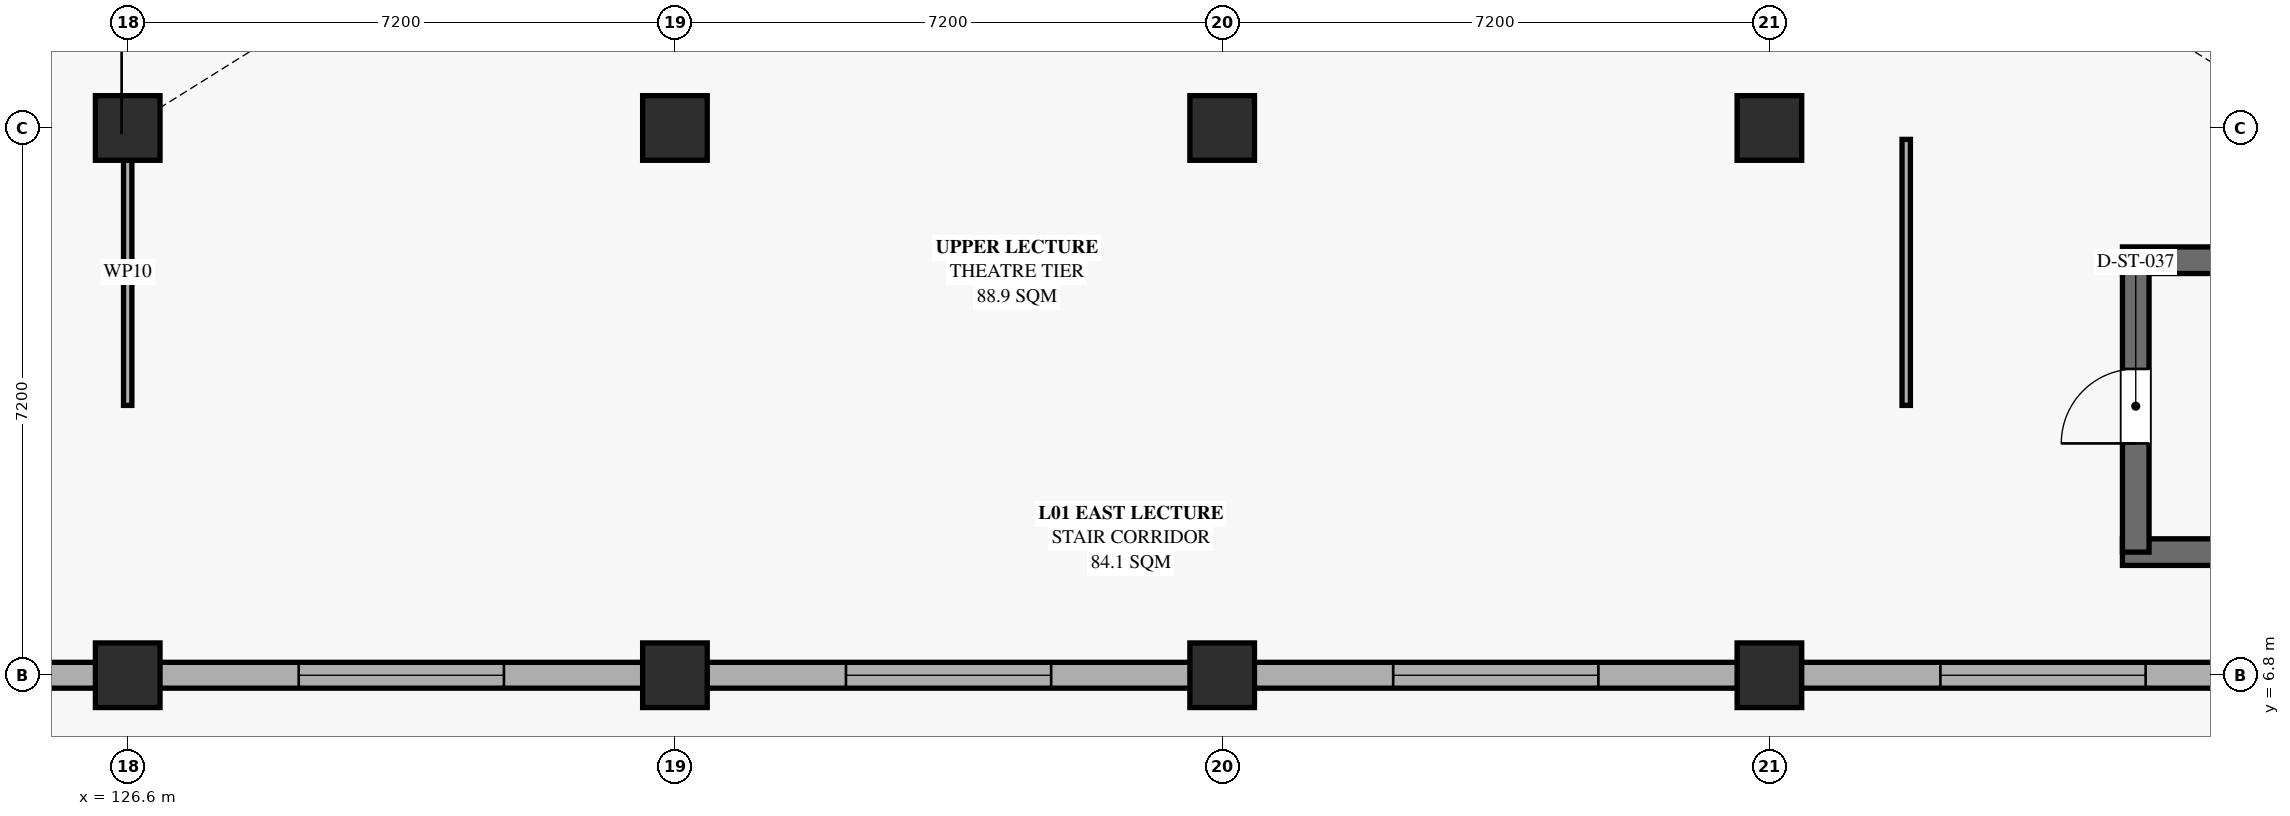
"""IFC4 building model, lengths in metres.
Left out: names, types, materials, properties, quantities, classifications, styles, units other than length and angle.
Written with IfcOpenShell. Run it as: python <this file> out.ifc"""

import sys

from ifc_helpers import new_model, si_unit, direction, frame, frame_2d, origin, origin_2d, place, context, subcontext, project, spatial, rectangle, extrude, element, fill, save


model = new_model("IFC4")
c1 = context("Model", 3, precision=1e-05, world=origin(), true_north=direction((0.0, 1.0)))
c2 = subcontext(c1, "Body", "Model", "MODEL_VIEW")
j1 = project(units=[si_unit("LENGTHUNIT", "METRE"), si_unit("PLANEANGLEUNIT", "RADIAN")], contexts=[c1])
p1 = place(None, origin())
s1 = spatial("IfcSite", under=j1, at=p1, CompositionType="ELEMENT")
p2 = place(p1, origin())
s2 = spatial("IfcBuilding", under=s1, at=p2, CompositionType="ELEMENT")
p3 = place(p2, frame((0.0, 0.0, 5.4)))
s3 = spatial("IfcBuildingStorey", under=s2, at=p3, CompositionType="ELEMENT", Elevation=5.4)
for number, where, z_axis, x_axis in (
    (1, (126.6, 6.8, 0.0), (0.0, 0.0, 1.0), (1.0, 0.0, 0.0)),
    (2, (133.8, 6.8, 0.0), (0.0, 0.0, 1.0), (1.0, 0.0, 0.0)),
    (3, (141.0, 6.8, 0.0), (0.0, 0.0, 1.0), (1.0, 0.0, 0.0)),
    (4, (148.2, 6.8, 0.0), (0.0, 0.0, 1.0), (1.0, 0.0, 0.0)),
    (5, (126.6, 14.0, 0.0), (0.0, 0.0, 1.0), (1.0, 0.0, 0.0)),
    (6, (133.8, 14.0, 0.0), (0.0, 0.0, 1.0), (1.0, 0.0, 0.0)),
    (7, (141.0, 14.0, 0.0), (0.0, 0.0, 1.0), (1.0, 0.0, 0.0)),
    (8, (148.2, 14.0, 0.0), (0.0, 0.0, 1.0), (1.0, 0.0, 0.0)),
):
    element("IfcColumn", number, at=place(p3, frame(where, z_axis=z_axis, x_axis=x_axis)), inside=s3, PredefinedType="COLUMN", context=c2, shape_type="SweptSolid", body=[
        extrude(rectangle(XDim=0.85, YDim=0.85, at=origin_2d()), origin(), (0.0, 0.0, 1.0), 5.04),
    ])
p4 = place(p3, frame((154.99, 6.8, 0.0), z_axis=(0.0, 0.0, 1.0), x_axis=(-1.0, 0.0, 0.0)))
e9 = element("IfcWall", 9, at=p4, inside=s3, PredefinedType="SOLIDWALL", context=c2, shape_type="SweptSolid", body=[
    extrude(rectangle(XDim=6.38, YDim=0.34, at=frame_2d((3.19, 0.0))), origin(), (0.0, 0.0, 1.0), 3.54),
])
p5 = place(p4, frame((1.84, 0.0, 0.9)))
e10 = element("IfcOpeningElement", 10, at=p5, cuts=e9, PredefinedType="OPENING", context=c2, shape_type="SweptSolid", body=[
    extrude(rectangle(XDim=2.7, YDim=2.5, at=frame_2d((1.35, 1.25))), frame((0.0, 0.18, 0.0), z_axis=(0.0, -1.0, 0.0), x_axis=(1.0, 0.0, 0.0)), (0.0, 0.0, 1.0), 0.36),
])
p6 = place(p3, frame((147.79, 6.8, 0.0), z_axis=(0.0, 0.0, 1.0), x_axis=(-1.0, 0.0, 0.0)))
e11 = element("IfcWall", 11, at=p6, inside=s3, PredefinedType="SOLIDWALL", context=c2, shape_type="SweptSolid", body=[
    extrude(rectangle(XDim=6.38, YDim=0.34, at=frame_2d((3.19, 0.0))), origin(), (0.0, 0.0, 1.0), 3.54),
])
p7 = place(p6, frame((1.84, 0.0, 0.9)))
e12 = element("IfcOpeningElement", 12, at=p7, cuts=e11, PredefinedType="OPENING", context=c2, shape_type="SweptSolid", body=[
    extrude(rectangle(XDim=2.7, YDim=2.5, at=frame_2d((1.35, 1.25))), frame((0.0, 0.18, 0.0), z_axis=(0.0, -1.0, 0.0), x_axis=(1.0, 0.0, 0.0)), (0.0, 0.0, 1.0), 0.36),
])
p8 = place(p3, frame((140.59, 6.8, 0.0), z_axis=(0.0, 0.0, 1.0), x_axis=(-1.0, 0.0, 0.0)))
e13 = element("IfcWall", 13, at=p8, inside=s3, PredefinedType="SOLIDWALL", context=c2, shape_type="SweptSolid", body=[
    extrude(rectangle(XDim=6.38, YDim=0.34, at=frame_2d((3.19, 0.0))), origin(), (0.0, 0.0, 1.0), 3.54),
])
p9 = place(p8, frame((1.84, 0.0, 0.9)))
e14 = element("IfcOpeningElement", 14, at=p9, cuts=e13, PredefinedType="OPENING", context=c2, shape_type="SweptSolid", body=[
    extrude(rectangle(XDim=2.7, YDim=2.5, at=frame_2d((1.35, 1.25))), frame((0.0, 0.18, 0.0), z_axis=(0.0, -1.0, 0.0), x_axis=(1.0, 0.0, 0.0)), (0.0, 0.0, 1.0), 0.36),
])
p10 = place(p3, frame((133.39, 6.8, 0.0), z_axis=(0.0, 0.0, 1.0), x_axis=(-1.0, 0.0, 0.0)))
e15 = element("IfcWall", 15, at=p10, inside=s3, PredefinedType="SOLIDWALL", context=c2, shape_type="SweptSolid", body=[
    extrude(rectangle(XDim=6.38, YDim=0.34, at=frame_2d((3.19, 0.0))), origin(), (0.0, 0.0, 1.0), 3.54),
])
p11 = place(p10, frame((1.84, 0.0, 0.9)))
e16 = element("IfcOpeningElement", 16, at=p11, cuts=e15, PredefinedType="OPENING", context=c2, shape_type="SweptSolid", body=[
    extrude(rectangle(XDim=2.7, YDim=2.5, at=frame_2d((1.35, 1.25))), frame((0.0, 0.18, 0.0), z_axis=(0.0, -1.0, 0.0), x_axis=(1.0, 0.0, 0.0)), (0.0, 0.0, 1.0), 0.36),
])
p12 = place(p3, frame((126.19, 6.8, 0.0), z_axis=(0.0, 0.0, 1.0), x_axis=(-1.0, 0.0, 0.0)))
e17 = element("IfcWall", 17, at=p12, inside=s3, PredefinedType="SOLIDWALL", context=c2, shape_type="SweptSolid", body=[
    extrude(rectangle(XDim=6.33, YDim=0.34, at=frame_2d((3.165, 0.0))), origin(), (0.0, 0.0, 1.0), 3.54),
])
p13 = place(p12, frame((1.815, 0.0, 0.9)))
e18 = element("IfcOpeningElement", 18, at=p13, cuts=e17, PredefinedType="OPENING", context=c2, shape_type="SweptSolid", body=[
    extrude(rectangle(XDim=2.7, YDim=2.5, at=frame_2d((1.35, 1.25))), frame((0.0, 0.18, 0.0), z_axis=(0.0, -1.0, 0.0), x_axis=(1.0, 0.0, 0.0)), (0.0, 0.0, 1.0), 0.36),
])
for number, where, z_axis, x_axis in (
    (19, (160.855, 8.42, 0.0), (0.0, 0.0, 1.0), (-1.0, 0.0, 0.0)),
    (20, (152.845, 12.26, 0.0), (0.0, 0.0, 1.0), (1.0, 0.0, 0.0)),
):
    element("IfcWall", number, at=place(p3, frame(where, z_axis=z_axis, x_axis=x_axis)), inside=s3, PredefinedType="SHEAR", context=c2, shape_type="SweptSolid", body=[
        extrude(rectangle(XDim=8.01, YDim=0.35, at=frame_2d((4.005, 0.0))), origin(), (0.0, 0.0, 1.0), 4.77),
    ])
p14 = place(p3, frame((153.02, 8.42, 0.0), z_axis=(0.0, 0.0, 1.0), x_axis=(0.0, 1.0, 0.0)))
e21 = element("IfcWall", 21, at=p14, inside=s3, PredefinedType="SHEAR", context=c2, shape_type="SweptSolid", body=[
    extrude(rectangle(XDim=3.84, YDim=0.35, at=frame_2d((1.92, 0.0))), origin(), (0.0, 0.0, 1.0), 4.77),
])
p15 = place(p14, frame((1.43, 0.0, 0.0)))
e22 = element("IfcOpeningElement", 22, at=p15, cuts=e21, PredefinedType="OPENING", context=c2, shape_type="SweptSolid", body=[
    extrude(rectangle(XDim=0.98, YDim=2.12, at=frame_2d((0.49, 1.06))), frame((0.0, 0.185, 0.0), z_axis=(0.0, -1.0, 0.0), x_axis=(1.0, 0.0, 0.0)), (0.0, 0.0, 1.0), 0.37),
])
for number, where, z_axis, x_axis in (
    (23, (126.6, 10.35, 0.0), (0.0, 0.0, 1.0), (0.0, 1.0, 0.0)),
    (24, (150.0, 13.85, 0.0), (0.0, 0.0, 1.0), (0.0, -1.0, 0.0)),
):
    element("IfcWall", number, at=place(p3, frame(where, z_axis=z_axis, x_axis=x_axis)), inside=s3, PredefinedType="PARTITIONING", context=c2, shape_type="SweptSolid", body=[
        extrude(rectangle(XDim=3.5, YDim=0.11, at=frame_2d((1.75, 0.0))), origin(), (0.0, 0.0, 1.0), 3.52),
    ])
p16 = place(p5, origin())
e25 = element("IfcWindow", 25, at=p16, inside=s3, PartitioningType="DOUBLE_PANEL_VERTICAL", PredefinedType="WINDOW", context=c2, shape_type="SweptSolid", body=[
    extrude(rectangle(XDim=2.7, YDim=2.5, at=frame_2d((1.35, 1.25))), frame((0.0, 0.03, 0.0), z_axis=(0.0, -1.0, 0.0), x_axis=(1.0, 0.0, 0.0)), (0.0, 0.0, 1.0), 0.06),
])
fill(e10, e25)
p17 = place(p7, origin())
e26 = element("IfcWindow", 26, at=p17, inside=s3, PartitioningType="DOUBLE_PANEL_VERTICAL", PredefinedType="WINDOW", context=c2, shape_type="SweptSolid", body=[
    extrude(rectangle(XDim=2.7, YDim=2.5, at=frame_2d((1.35, 1.25))), frame((0.0, 0.03, 0.0), z_axis=(0.0, -1.0, 0.0), x_axis=(1.0, 0.0, 0.0)), (0.0, 0.0, 1.0), 0.06),
])
fill(e12, e26)
p18 = place(p9, origin())
e27 = element("IfcWindow", 27, at=p18, inside=s3, PartitioningType="DOUBLE_PANEL_VERTICAL", PredefinedType="WINDOW", context=c2, shape_type="SweptSolid", body=[
    extrude(rectangle(XDim=2.7, YDim=2.5, at=frame_2d((1.35, 1.25))), frame((0.0, 0.03, 0.0), z_axis=(0.0, -1.0, 0.0), x_axis=(1.0, 0.0, 0.0)), (0.0, 0.0, 1.0), 0.06),
])
fill(e14, e27)
p19 = place(p11, origin())
e28 = element("IfcWindow", 28, at=p19, inside=s3, PartitioningType="DOUBLE_PANEL_VERTICAL", PredefinedType="WINDOW", context=c2, shape_type="SweptSolid", body=[
    extrude(rectangle(XDim=2.7, YDim=2.5, at=frame_2d((1.35, 1.25))), frame((0.0, 0.03, 0.0), z_axis=(0.0, -1.0, 0.0), x_axis=(1.0, 0.0, 0.0)), (0.0, 0.0, 1.0), 0.06),
])
fill(e16, e28)
p20 = place(p15, origin())
e29 = element("IfcDoor", 29, at=p20, inside=s3, OperationType="SINGLE_SWING_LEFT", PredefinedType="DOOR", context=c2, shape_type="SweptSolid", body=[
    extrude(rectangle(XDim=0.98, YDim=2.12, at=frame_2d((0.49, 1.06))), frame((0.0, 0.025, 0.0), z_axis=(0.0, -1.0, 0.0), x_axis=(1.0, 0.0, 0.0)), (0.0, 0.0, 1.0), 0.05),
])
fill(e22, e29)
save(model, sys.argv[1])
